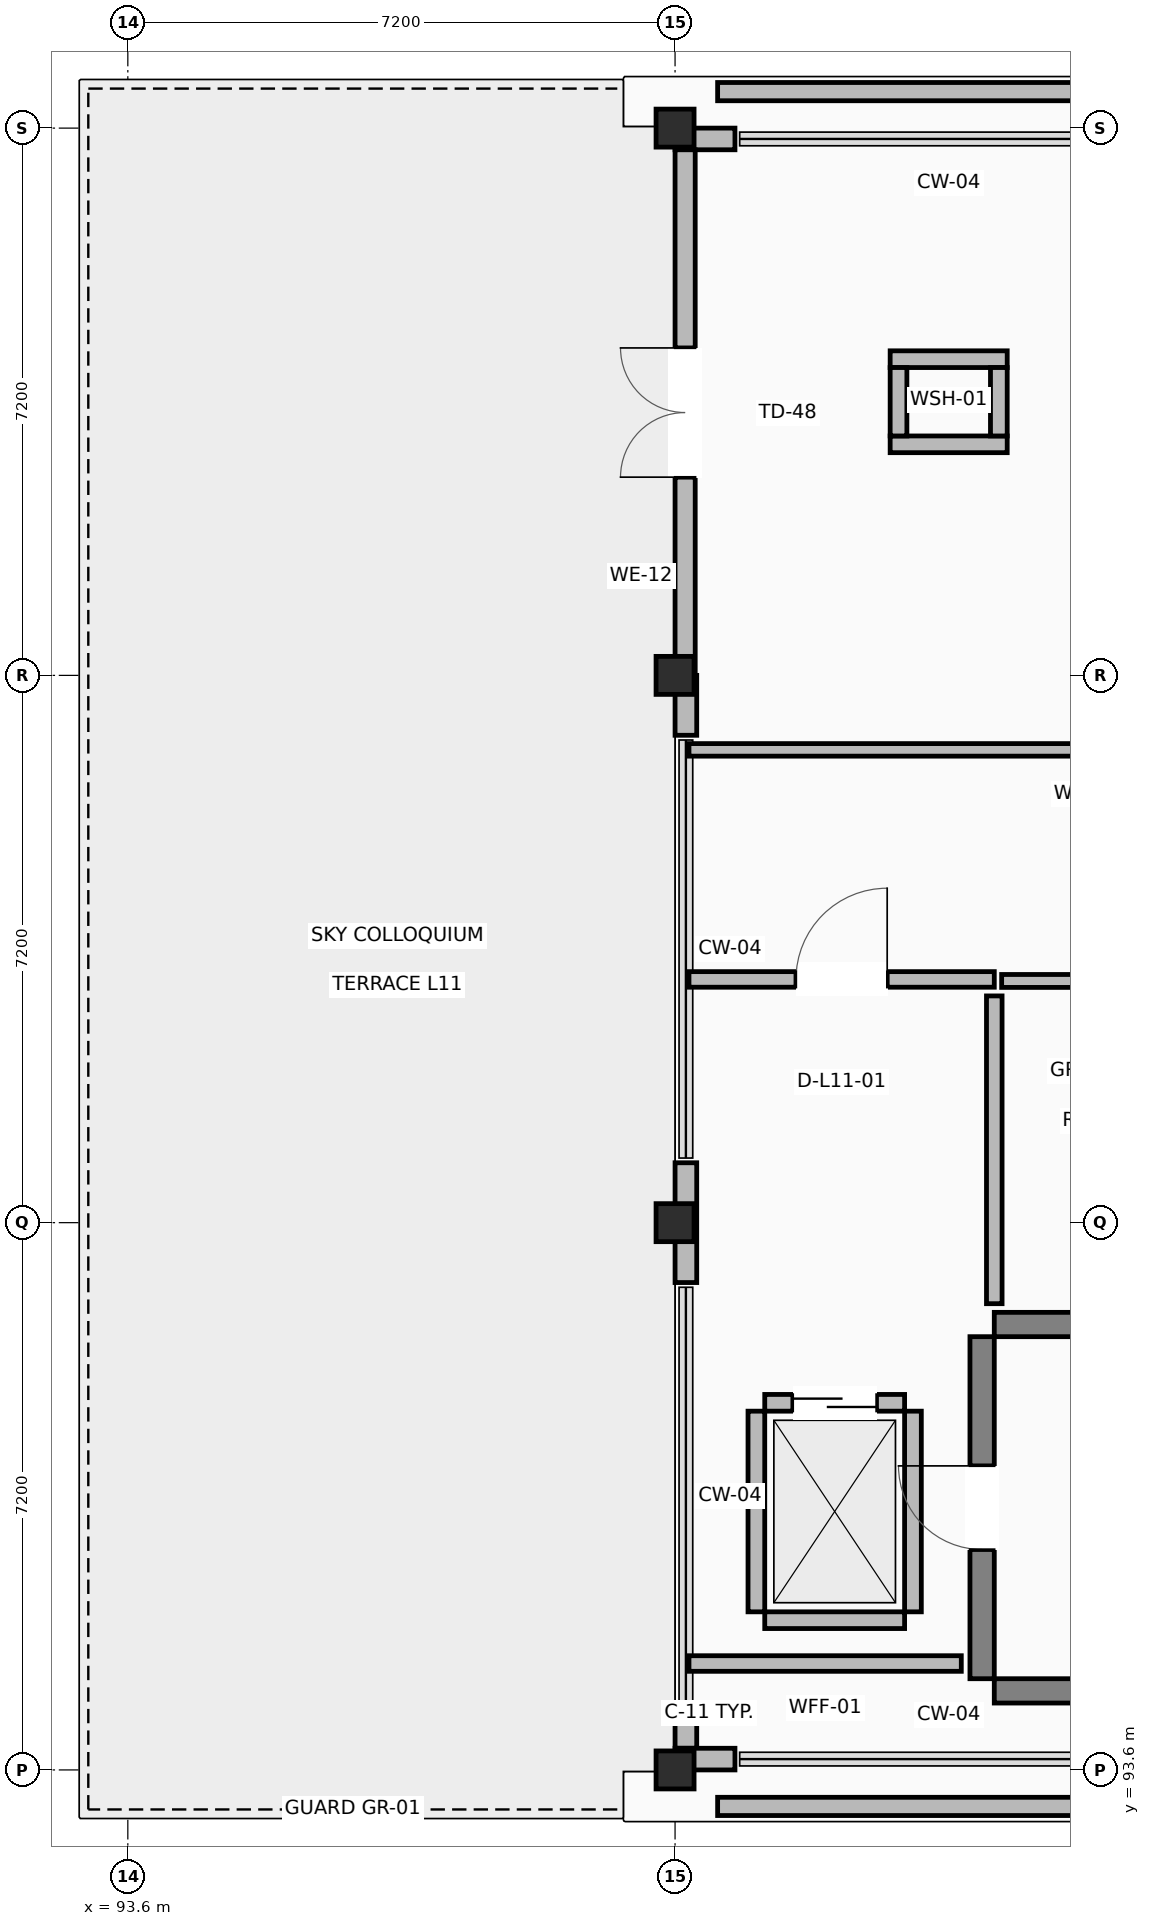
"""IFC4 building model, lengths in metres.
Left out: names, types, materials, properties, quantities, classifications, styles, units other than length and angle.
Written with IfcOpenShell. Run it as: python <this file> out.ifc"""

import sys

from ifc_helpers import new_model, si_unit, direction, frame, frame_2d, origin, origin_2d, place, context, subcontext, project, spatial, rectangle, extrude, element, fill, save


model = new_model("IFC4")
c1 = context("Model", 3, precision=1e-05, world=origin(), true_north=direction((0.0, 1.0)))
c2 = subcontext(c1, "Body", "Model", "MODEL_VIEW")
j1 = project(units=[si_unit("LENGTHUNIT", "METRE"), si_unit("PLANEANGLEUNIT", "RADIAN")], contexts=[c1])
p1 = place(None, origin())
s1 = spatial("IfcSite", under=j1, at=p1, CompositionType="ELEMENT")
p2 = place(p1, origin())
s2 = spatial("IfcBuilding", under=s1, at=p2, CompositionType="ELEMENT")
p3 = place(p2, frame((0.0, 0.0, 48.0)))
s3 = spatial("IfcBuildingStorey", under=s2, at=p3, CompositionType="ELEMENT", Elevation=48.0)
for number, where, z_axis, x_axis in (
    (1, (100.8, 93.6, 0.0), (0.0, 0.0, 1.0), (1.0, 0.0, 0.0)),
    (2, (100.8, 100.8, 0.0), (0.0, 0.0, 1.0), (1.0, 0.0, 0.0)),
    (3, (100.8, 108.0, 0.0), (0.0, 0.0, 1.0), (1.0, 0.0, 0.0)),
    (4, (100.8, 115.2, 0.0), (0.0, 0.0, 1.0), (1.0, 0.0, 0.0)),
):
    element("IfcColumn", number, at=place(p3, frame(where, z_axis=z_axis, x_axis=x_axis)), inside=s3, PredefinedType="COLUMN", context=c2, shape_type="SweptSolid", body=[
        extrude(rectangle(XDim=0.5, YDim=0.5, at=origin_2d()), origin(), (0.0, 0.0, 1.0), 3.92),
    ])
for number, where, z_axis, x_axis in (
    (5, (105.0, 94.64, 0.0), (0.0, 0.0, 1.0), (1.0, 0.0, 0.0)),
    (6, (105.0, 99.46, 0.0), (0.0, 0.0, 1.0), (1.0, 0.0, 0.0)),
):
    element("IfcWall", number, at=place(p3, frame(where, z_axis=z_axis, x_axis=x_axis)), inside=s3, PredefinedType="SHEAR", context=c2, shape_type="SweptSolid", body=[
        extrude(rectangle(XDim=9.5, YDim=0.32, at=frame_2d((4.75, 0.0))), origin(), (0.0, 0.0, 1.0), 3.92),
    ])
p4 = place(p3, frame((104.84, 94.8, 0.0), z_axis=(0.0, 0.0, 1.0), x_axis=(0.0, 1.0, 0.0)))
e7 = element("IfcWall", 7, at=p4, inside=s3, PredefinedType="SHEAR", context=c2, shape_type="SweptSolid", body=[
    extrude(rectangle(XDim=4.5, YDim=0.32, at=frame_2d((2.25, 0.0))), origin(), (0.0, 0.0, 1.0), 3.92),
])
p5 = place(p4, frame((1.7, 0.0, 0.0)))
e8 = element("IfcOpeningElement", 8, at=p5, cuts=e7, PredefinedType="OPENING", context=c2, shape_type="SweptSolid", body=[
    extrude(rectangle(XDim=1.1, YDim=2.15, at=frame_2d((0.55, 1.075))), frame((0.0, 0.17, 0.0), z_axis=(0.0, -1.0, 0.0), x_axis=(1.0, 0.0, 0.0)), (0.0, 0.0, 1.0), 0.34),
])
p6 = place(p3, frame((101.588, 115.058, 0.0), z_axis=(0.0, 0.0, 1.0), x_axis=(-1.0, 0.0, 0.0)))
e9 = element("IfcWall", 9, at=p6, inside=s3, PredefinedType="STANDARD", context=c2, shape_type="SweptSolid", body=[
    extrude(rectangle(XDim=0.788, YDim=0.285, at=frame_2d((0.394, 0.0))), origin(), (0.0, 0.0, 1.0), 2.96),
])
p7 = place(p3, frame((100.933, 108.0, 0.0), z_axis=(0.0, 0.0, 1.0), x_axis=(0.0, 1.0, 0.0)))
e10 = element("IfcWall", 10, at=p7, inside=s3, PredefinedType="STANDARD", context=c2, shape_type="SweptSolid", body=[
    extrude(rectangle(XDim=6.915, YDim=0.265, at=frame_2d((3.458, 0.0))), origin(), (0.0, 0.0, 1.0), 2.96),
])
p8 = place(p7, frame((2.608, 0.0, 0.0)))
e11 = element("IfcOpeningElement", 11, at=p8, cuts=e10, PredefinedType="OPENING", context=c2, shape_type="SweptSolid", body=[
    extrude(rectangle(XDim=1.7, YDim=2.2, at=frame_2d((0.85, 1.1))), frame((0.0, 0.142, 0.0), z_axis=(0.0, -1.0, 0.0), x_axis=(1.0, 0.0, 0.0)), (0.0, 0.0, 1.0), 0.285),
])
p9 = place(p3, frame((100.942, 108.0, 0.0), z_axis=(0.0, 0.0, 1.0), x_axis=(0.0, -1.0, 0.0)))
e12 = element("IfcWall", 12, at=p9, inside=s3, PredefinedType="STANDARD", context=c2, shape_type="SweptSolid", body=[
    extrude(rectangle(XDim=0.788, YDim=0.285, at=frame_2d((0.394, 0.0))), origin(), (0.0, 0.0, 1.0), 2.96),
])
p10 = place(p3, frame((100.942, 101.588, 0.0), z_axis=(0.0, 0.0, 1.0), x_axis=(0.0, -1.0, 0.0)))
e13 = element("IfcWall", 13, at=p10, inside=s3, PredefinedType="STANDARD", context=c2, shape_type="SweptSolid", body=[
    extrude(rectangle(XDim=1.576, YDim=0.285, at=frame_2d((0.788, 0.0))), origin(), (0.0, 0.0, 1.0), 2.96),
])
p11 = place(p3, frame((100.942, 94.388, 0.0), z_axis=(0.0, 0.0, 1.0), x_axis=(0.0, -1.0, 0.0)))
e14 = element("IfcWall", 14, at=p11, inside=s3, PredefinedType="STANDARD", context=c2, shape_type="SweptSolid", body=[
    extrude(rectangle(XDim=0.503, YDim=0.285, at=frame_2d((0.251, 0.0))), origin(), (0.0, 0.0, 1.0), 2.96),
])
p12 = place(p3, frame((100.8, 93.742, 0.0), z_axis=(0.0, 0.0, 1.0), x_axis=(1.0, 0.0, 0.0)))
e15 = element("IfcWall", 15, at=p12, inside=s3, PredefinedType="STANDARD", context=c2, shape_type="SweptSolid", body=[
    extrude(rectangle(XDim=0.788, YDim=0.285, at=frame_2d((0.394, 0.0))), origin(), (0.0, 0.0, 1.0), 2.96),
])
for number, where, z_axis, x_axis in (
    (16, (101.36, 115.68, 0.0), (0.0, 0.0, 1.0), (1.0, 0.0, 0.0)),
    (17, (151.8, 93.12, 0.0), (0.0, 0.0, 1.0), (-1.0, 0.0, 0.0)),
):
    element("IfcWall", number, at=place(p3, frame(where, z_axis=z_axis, x_axis=x_axis)), inside=s3, PredefinedType="PARAPET", context=c2, shape_type="SweptSolid", body=[
        extrude(rectangle(XDim=50.44, YDim=0.24, at=frame_2d((25.22, 0.0))), origin(), (0.0, 0.0, 1.0), 1.12),
    ])
p13 = place(p3, frame((101.98, 95.57, 0.0), z_axis=(0.0, 0.0, 1.0), x_axis=(1.0, 0.0, 0.0)))
e18 = element("IfcWall", 18, at=p13, inside=s3, PredefinedType="STANDARD", context=c2, shape_type="SweptSolid", body=[
    extrude(rectangle(XDim=1.84, YDim=0.22, at=frame_2d((0.92, 0.0))), origin(), (0.0, 0.0, 1.0), 2.96),
])
p14 = place(p3, frame((101.98, 98.43, 0.0), z_axis=(0.0, 0.0, 1.0), x_axis=(1.0, 0.0, 0.0)))
e19 = element("IfcWall", 19, at=p14, inside=s3, PredefinedType="STANDARD", context=c2, shape_type="SweptSolid", body=[
    extrude(rectangle(XDim=1.84, YDim=0.22, at=frame_2d((0.92, 0.0))), origin(), (0.0, 0.0, 1.0), 2.96),
])
p15 = place(p14, frame((0.37, 0.0, 0.0)))
e20 = element("IfcOpeningElement", 20, at=p15, cuts=e19, PredefinedType="OPENING", context=c2, shape_type="SweptSolid", body=[
    extrude(rectangle(XDim=1.1, YDim=2.15, at=frame_2d((0.55, 1.075))), frame((0.0, 0.12, 0.0), z_axis=(0.0, -1.0, 0.0), x_axis=(1.0, 0.0, 0.0)), (0.0, 0.0, 1.0), 0.24),
])
for number, where, z_axis, x_axis in (
    (21, (101.87, 95.68, 0.0), (0.0, 0.0, 1.0), (0.0, 1.0, 0.0)),
    (22, (103.93, 95.68, 0.0), (0.0, 0.0, 1.0), (0.0, 1.0, 0.0)),
):
    element("IfcWall", number, at=place(p3, frame(where, z_axis=z_axis, x_axis=x_axis)), inside=s3, PredefinedType="STANDARD", context=c2, shape_type="SweptSolid", body=[
        extrude(rectangle(XDim=2.64, YDim=0.22, at=frame_2d((1.32, 0.0))), origin(), (0.0, 0.0, 1.0), 2.96),
    ])
for number, where, z_axis, x_axis in (
    (23, (103.63, 111.04, 0.0), (0.0, 0.0, 1.0), (1.0, 0.0, 0.0)),
    (24, (103.63, 112.16, 0.0), (0.0, 0.0, 1.0), (1.0, 0.0, 0.0)),
):
    element("IfcWall", number, at=place(p3, frame(where, z_axis=z_axis, x_axis=x_axis)), inside=s3, PredefinedType="STANDARD", context=c2, shape_type="SweptSolid", body=[
        extrude(rectangle(XDim=1.54, YDim=0.22, at=frame_2d((0.77, 0.0))), origin(), (0.0, 0.0, 1.0), 2.96),
    ])
for number, where, z_axis, x_axis in (
    (25, (103.74, 111.15, 0.0), (0.0, 0.0, 1.0), (0.0, 1.0, 0.0)),
    (26, (105.06, 111.15, 0.0), (0.0, 0.0, 1.0), (0.0, 1.0, 0.0)),
):
    element("IfcWall", number, at=place(p3, frame(where, z_axis=z_axis, x_axis=x_axis)), inside=s3, PredefinedType="STANDARD", context=c2, shape_type="SweptSolid", body=[
        extrude(rectangle(XDim=0.9, YDim=0.22, at=frame_2d((0.45, 0.0))), origin(), (0.0, 0.0, 1.0), 2.96),
    ])
p16 = place(p3, frame((104.566, 95.0, 0.0), z_axis=(0.0, 0.0, 1.0), x_axis=(-1.0, 0.0, 0.0)))
e27 = element("IfcWall", 27, at=p16, inside=s3, PredefinedType="PARTITIONING", context=c2, shape_type="SweptSolid", body=[
    extrude(rectangle(XDim=3.583, YDim=0.205, at=frame_2d((1.792, 0.0))), origin(), (0.0, 0.0, 1.0), 2.96),
])
p17 = place(p3, frame((100.983, 104.0, 0.0), z_axis=(0.0, 0.0, 1.0), x_axis=(1.0, 0.0, 0.0)))
e28 = element("IfcWall", 28, at=p17, inside=s3, PredefinedType="PARTITIONING", context=c2, shape_type="SweptSolid", body=[
    extrude(rectangle(XDim=4.017, YDim=0.205, at=frame_2d((2.009, 0.0))), origin(), (0.0, 0.0, 1.0), 2.96),
])
p18 = place(p17, frame((1.408, 0.0, 0.0)))
e29 = element("IfcOpeningElement", 29, at=p18, cuts=e28, PredefinedType="OPENING", context=c2, shape_type="SweptSolid", body=[
    extrude(rectangle(XDim=1.2, YDim=2.15, at=frame_2d((0.6, 1.075))), frame((0.0, 0.113, 0.0), z_axis=(0.0, -1.0, 0.0), x_axis=(1.0, 0.0, 0.0)), (0.0, 0.0, 1.0), 0.225),
])
p19 = place(p3, frame((105.0, 103.783, 0.0), z_axis=(0.0, 0.0, 1.0), x_axis=(0.0, -1.0, 0.0)))
e30 = element("IfcWall", 30, at=p19, inside=s3, PredefinedType="PARTITIONING", context=c2, shape_type="SweptSolid", body=[
    extrude(rectangle(XDim=4.049, YDim=0.205, at=frame_2d((2.024, 0.0))), origin(), (0.0, 0.0, 1.0), 2.96),
])
p20 = place(p3, frame((124.023, 107.02, 0.0), z_axis=(0.0, 0.0, 1.0), x_axis=(-1.0, 0.0, 0.0)))
e31 = element("IfcWall", 31, at=p20, inside=s3, PredefinedType="PARTITIONING", context=c2, shape_type="SweptSolid", body=[
    extrude(rectangle(XDim=23.04, YDim=0.165, at=frame_2d((11.52, 0.0))), origin(), (0.0, 0.0, 1.0), 2.96),
])
p21 = place(p20, frame((10.96, 0.0, 0.0)))
e32 = element("IfcOpeningElement", 32, at=p21, cuts=e31, PredefinedType="OPENING", context=c2, shape_type="SweptSolid", body=[
    extrude(rectangle(XDim=1.12, YDim=2.15, at=frame_2d((0.56, 1.075))), frame((0.0, 0.093, 0.0), z_axis=(0.0, -1.0, 0.0), x_axis=(1.0, 0.0, 0.0)), (0.0, 0.0, 1.0), 0.185),
])
p22 = place(p3, frame((105.097, 103.98, 0.0), z_axis=(0.0, 0.0, 1.0), x_axis=(1.0, 0.0, 0.0)))
e33 = element("IfcWall", 33, at=p22, inside=s3, PredefinedType="PARTITIONING", context=c2, shape_type="SweptSolid", body=[
    extrude(rectangle(XDim=10.103, YDim=0.17, at=frame_2d((5.052, 0.0))), origin(), (0.0, 0.0, 1.0), 2.96),
])
p23 = place(p22, frame((4.477, 0.0, 0.0)))
e34 = element("IfcOpeningElement", 34, at=p23, cuts=e33, PredefinedType="OPENING", context=c2, shape_type="SweptSolid", body=[
    extrude(rectangle(XDim=1.15, YDim=2.15, at=frame_2d((0.575, 1.075))), frame((0.0, 0.095, 0.0), z_axis=(0.0, -1.0, 0.0), x_axis=(1.0, 0.0, 0.0)), (0.0, 0.0, 1.0), 0.19),
])
p24 = place(p8, origin())
e35 = element("IfcDoor", 35, at=p24, inside=s3, OperationType="DOUBLE_DOOR_SINGLE_SWING", PredefinedType="DOOR", context=c2, shape_type="SweptSolid", body=[
    extrude(rectangle(XDim=1.7, YDim=2.2, at=frame_2d((0.85, 1.1))), frame((0.0, 0.025, 0.0), z_axis=(0.0, -1.0, 0.0), x_axis=(1.0, 0.0, 0.0)), (0.0, 0.0, 1.0), 0.05),
])
fill(e11, e35)
p25 = place(p5, origin())
e36 = element("IfcDoor", 36, at=p25, inside=s3, OperationType="SINGLE_SWING_RIGHT", PredefinedType="DOOR", context=c2, shape_type="SweptSolid", body=[
    extrude(rectangle(XDim=1.1, YDim=2.15, at=frame_2d((0.55, 1.075))), frame((0.0, 0.025, 0.0), z_axis=(0.0, -1.0, 0.0), x_axis=(1.0, 0.0, 0.0)), (0.0, 0.0, 1.0), 0.05),
])
fill(e8, e36)
p26 = place(p15, origin())
e37 = element("IfcDoor", 37, at=p26, inside=s3, OperationType="SLIDING_TO_RIGHT", PredefinedType="DOOR", context=c2, shape_type="SweptSolid", body=[
    extrude(rectangle(XDim=1.1, YDim=2.15, at=frame_2d((0.55, 1.075))), frame((0.0, 0.025, 0.0), z_axis=(0.0, -1.0, 0.0), x_axis=(1.0, 0.0, 0.0)), (0.0, 0.0, 1.0), 0.05),
])
fill(e20, e37)
p27 = place(p18, origin())
e38 = element("IfcDoor", 38, at=p27, inside=s3, OperationType="SINGLE_SWING_RIGHT", PredefinedType="DOOR", context=c2, shape_type="SweptSolid", body=[
    extrude(rectangle(XDim=1.2, YDim=2.15, at=frame_2d((0.6, 1.075))), frame((0.0, 0.025, 0.0), z_axis=(0.0, -1.0, 0.0), x_axis=(1.0, 0.0, 0.0)), (0.0, 0.0, 1.0), 0.05),
])
fill(e29, e38)
save(model, sys.argv[1])
